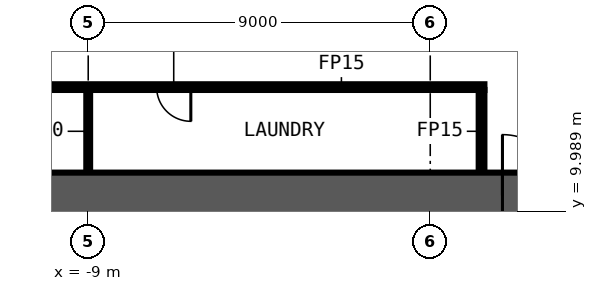
"""IFC4 building model, lengths in metres.
Left out: names, types, materials, properties, quantities, classifications, styles, units other than length and angle.
Written with IfcOpenShell. Run it as: python <this file> out.ifc"""

import sys

from ifc_helpers import new_model, si_unit, direction, frame, frame_2d, origin, place, context, subcontext, project, spatial, rectangle, extrude, element, fill, save


model = new_model("IFC4")
c1 = context("Model", 3, precision=1e-05, world=origin(), true_north=direction((0.0, 1.0)))
c2 = subcontext(c1, "Body", "Model", "MODEL_VIEW")
j1 = project(units=[si_unit("LENGTHUNIT", "METRE"), si_unit("PLANEANGLEUNIT", "RADIAN")], contexts=[c1])
p1 = place(None, origin())
s1 = spatial("IfcSite", under=j1, at=p1, CompositionType="ELEMENT")
p2 = place(p1, origin())
s2 = spatial("IfcBuilding", under=s1, at=p2, CompositionType="ELEMENT")
p3 = place(p2, frame((0.0, 0.0, 55.1)))
s3 = spatial("IfcBuildingStorey", under=s2, at=p3, CompositionType="ELEMENT", Elevation=55.1)
p4 = place(p3, frame((1.425, 13.25, 0.0), z_axis=(0.0, 0.0, 1.0), x_axis=(-1.0, 0.0, 0.0)))
e1 = element("IfcWall", 1, at=p4, inside=s3, PredefinedType="PARTITIONING", context=c2, shape_type="SweptSolid", body=[
    extrude(rectangle(XDim=17.75, YDim=0.15, at=frame_2d((8.875, 0.0))), origin(), (0.0, 0.0, 1.0), 3.3),
])
p5 = place(p4, frame((7.725, 0.0, 0.0)))
e2 = element("IfcOpeningElement", 2, at=p5, cuts=e1, PredefinedType="OPENING", context=c2, shape_type="SweptSolid", body=[
    extrude(rectangle(XDim=0.9, YDim=2.1, at=frame_2d((0.45, 1.05))), frame((0.0, 0.085, 0.0), z_axis=(0.0, -1.0, 0.0), x_axis=(1.0, 0.0, 0.0)), (0.0, 0.0, 1.0), 0.17),
])
p6 = place(p4, frame((13.6, 0.0, 0.0)))
e3 = element("IfcOpeningElement", 3, at=p6, cuts=e1, PredefinedType="OPENING", context=c2, shape_type="SweptSolid", body=[
    extrude(rectangle(XDim=0.9, YDim=2.1, at=frame_2d((0.45, 1.05))), frame((0.0, 0.085, 0.0), z_axis=(0.0, -1.0, 0.0), x_axis=(1.0, 0.0, 0.0)), (0.0, 0.0, 1.0), 0.17),
])
p7 = place(p3, frame((1.35, 11.0, 0.0), z_axis=(0.0, 0.0, 1.0), x_axis=(0.0, 1.0, 0.0)))
e4 = element("IfcWall", 4, at=p7, inside=s3, PredefinedType="PARTITIONING", context=c2, shape_type="SweptSolid", body=[
    extrude(rectangle(XDim=2.175, YDim=0.15, at=frame_2d((1.087, 0.0))), origin(), (0.0, 0.0, 1.0), 3.3),
])
p8 = place(p3, frame((-9.0, 11.0, 0.0), z_axis=(0.0, 0.0, 1.0), x_axis=(0.0, 1.0, 0.0)))
e5 = element("IfcWall", 5, at=p8, inside=s3, PredefinedType="PARTITIONING", context=c2, shape_type="SweptSolid", body=[
    extrude(rectangle(XDim=2.175, YDim=0.1, at=frame_2d((1.087, 0.0))), origin(), (0.0, 0.0, 1.0), 3.3),
])
p9 = place(p3, frame((-14.0, 10.4, 0.0), z_axis=(0.0, 0.0, 1.0), x_axis=(1.0, 0.0, 0.0)))
e6 = element("IfcWall", 6, at=p9, inside=s3, PredefinedType="SHEAR", context=c2, shape_type="SweptSolid", body=[
    extrude(rectangle(XDim=28.0, YDim=1.2, at=frame_2d((14.0, 0.0))), origin(), (0.0, 0.0, 1.0), 3.3),
])
p10 = place(p9, frame((15.9, 0.0, 0.0)))
e7 = element("IfcOpeningElement", 7, at=p10, cuts=e6, PredefinedType="OPENING", context=c2, shape_type="SweptSolid", body=[
    extrude(rectangle(XDim=1.6, YDim=2.1, at=frame_2d((0.8, 1.05))), frame((0.0, 0.61, 0.0), z_axis=(0.0, -1.0, 0.0), x_axis=(1.0, 0.0, 0.0)), (0.0, 0.0, 1.0), 1.22),
])
p11 = place(p5, origin())
e8 = element("IfcDoor", 8, at=p11, inside=s3, OperationType="SINGLE_SWING_RIGHT", PredefinedType="DOOR", context=c2, shape_type="SweptSolid", body=[
    extrude(rectangle(XDim=0.9, YDim=2.1, at=frame_2d((0.45, 1.05))), frame((0.0, 0.025, 0.0), z_axis=(0.0, -1.0, 0.0), x_axis=(1.0, 0.0, 0.0)), (0.0, 0.0, 1.0), 0.05),
])
fill(e2, e8)
p12 = place(p10, origin())
e9 = element("IfcDoor", 9, at=p12, inside=s3, OperationType="DOUBLE_DOOR_SINGLE_SWING", PredefinedType="DOOR", context=c2, shape_type="SweptSolid", body=[
    extrude(rectangle(XDim=1.6, YDim=2.1, at=frame_2d((0.8, 1.05))), frame((0.0, 0.025, 0.0), z_axis=(0.0, -1.0, 0.0), x_axis=(1.0, 0.0, 0.0)), (0.0, 0.0, 1.0), 0.05),
])
fill(e7, e9)
save(model, sys.argv[1])
